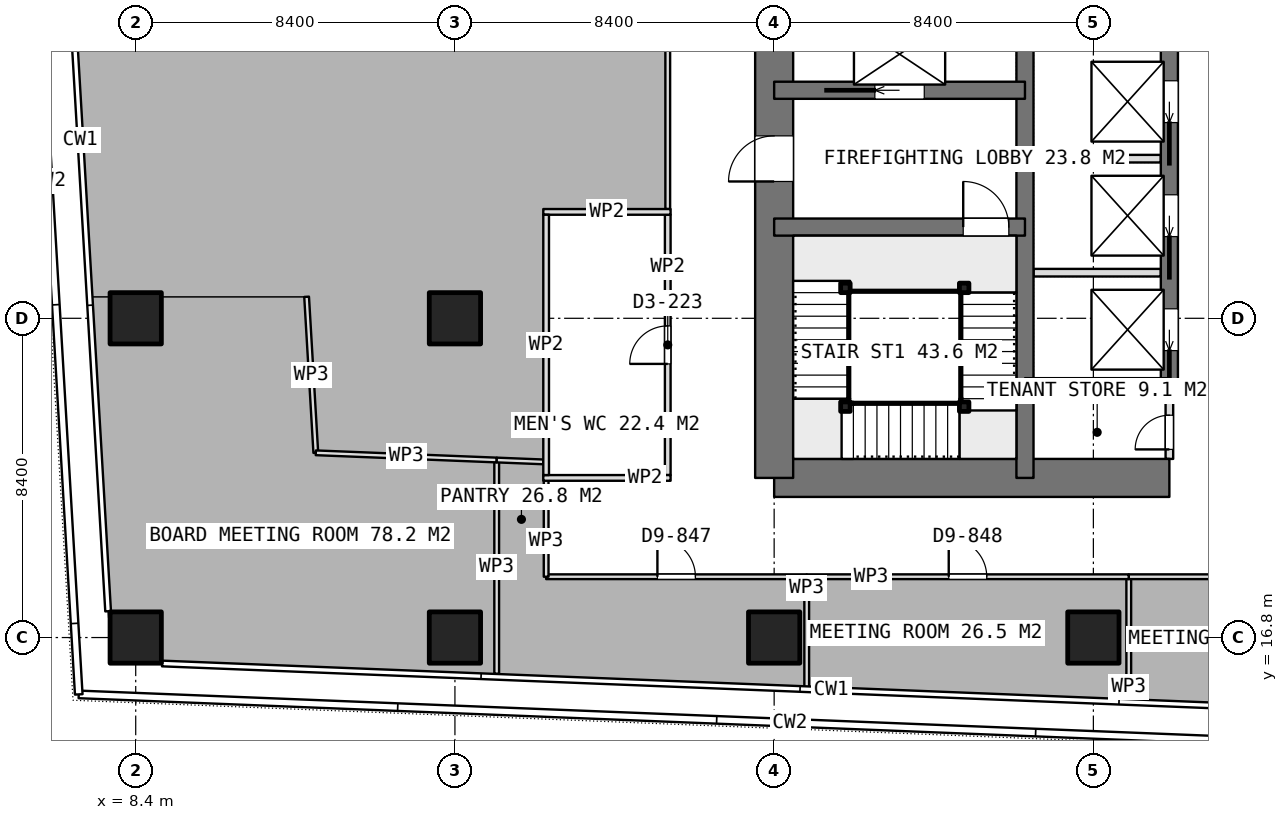
"""IFC4 building model, lengths in metres.
Left out: names, types, materials, properties, quantities, classifications, styles, units other than length and angle.
Written with IfcOpenShell. Run it as: python <this file> out.ifc"""

import sys

from ifc_helpers import new_model, si_unit, direction, frame, frame_2d, origin, origin_2d, place, context, subcontext, project, spatial, rectangle, extrude, element, fill, save


model = new_model("IFC4")
c1 = context("Model", 3, precision=1e-05, world=origin(), true_north=direction((0.0, 1.0)))
c2 = subcontext(c1, "Body", "Model", "MODEL_VIEW")
j1 = project(units=[si_unit("LENGTHUNIT", "METRE"), si_unit("PLANEANGLEUNIT", "RADIAN")], contexts=[c1])
p1 = place(None, origin())
s1 = spatial("IfcSite", under=j1, at=p1, CompositionType="ELEMENT")
p2 = place(p1, origin())
s2 = spatial("IfcBuilding", under=s1, at=p2, CompositionType="ELEMENT")
p3 = place(p2, frame((0.0, 0.0, 210.2)))
s3 = spatial("IfcBuildingStorey", under=s2, at=p3, CompositionType="ELEMENT", Elevation=210.2)
p4 = place(p3, frame((25.2, 21.0, 0.0), z_axis=(0.0, 0.0, 1.0), x_axis=(1.0, 0.0, 0.0)))
e1 = element("IfcWall", 1, at=p4, inside=s3, PredefinedType="SHEAR", context=c2, shape_type="SweptSolid", body=[
    extrude(rectangle(XDim=10.4, YDim=1.0, at=frame_2d((5.2, 0.0))), origin(), (0.0, 0.0, 1.0), 3.75),
])
p5 = place(p3, frame((25.2, 21.0, 0.0), z_axis=(0.0, 0.0, 1.0), x_axis=(0.0, 1.0, 0.0)))
e2 = element("IfcWall", 2, at=p5, inside=s3, PredefinedType="SHEAR", context=c2, shape_type="SweptSolid", body=[
    extrude(rectangle(XDim=25.2, YDim=1.0, at=frame_2d((12.6, 0.0))), origin(), (0.0, 0.0, 1.0), 3.75),
])
p6 = place(p5, frame((7.8, 0.0, 0.0)))
e3 = element("IfcOpeningElement", 3, at=p6, cuts=e2, PredefinedType="OPENING", context=c2, shape_type="SweptSolid", body=[
    extrude(rectangle(XDim=1.2, YDim=2.1, at=frame_2d((0.6, 1.05))), frame((0.0, 0.51, 0.0), z_axis=(0.0, -1.0, 0.0), x_axis=(1.0, 0.0, 0.0)), (0.0, 0.0, 1.0), 1.02),
])
p7 = place(p5, frame((14.25, 0.0, 0.0)))
e4 = element("IfcOpeningElement", 4, at=p7, cuts=e2, PredefinedType="OPENING", context=c2, shape_type="SweptSolid", body=[
    extrude(rectangle(XDim=0.9, YDim=2.1, at=frame_2d((0.45, 1.05))), frame((0.0, 0.51, 0.0), z_axis=(0.0, -1.0, 0.0), x_axis=(1.0, 0.0, 0.0)), (0.0, 0.0, 1.0), 1.02),
])
p8 = place(p5, frame((16.85, 0.0, 0.0)))
e5 = element("IfcOpeningElement", 5, at=p8, cuts=e2, PredefinedType="OPENING", context=c2, shape_type="SweptSolid", body=[
    extrude(rectangle(XDim=0.9, YDim=2.1, at=frame_2d((0.45, 1.05))), frame((0.0, 0.51, 0.0), z_axis=(0.0, -1.0, 0.0), x_axis=(1.0, 0.0, 0.0)), (0.0, 0.0, 1.0), 1.02),
])
p9 = place(p5, frame((19.025, 0.0, 0.0)))
e6 = element("IfcOpeningElement", 6, at=p9, cuts=e2, PredefinedType="OPENING", context=c2, shape_type="SweptSolid", body=[
    extrude(rectangle(XDim=1.2, YDim=2.1, at=frame_2d((0.6, 1.05))), frame((0.0, 0.51, 0.0), z_axis=(0.0, -1.0, 0.0), x_axis=(1.0, 0.0, 0.0)), (0.0, 0.0, 1.0), 1.02),
])
p10 = place(p3, frame((31.8, 21.0, 0.0), z_axis=(0.0, 0.0, 1.0), x_axis=(0.0, 1.0, 0.0)))
e7 = element("IfcWall", 7, at=p10, inside=s3, PredefinedType="SHEAR", context=c2, shape_type="SweptSolid", body=[
    extrude(rectangle(XDim=25.2, YDim=0.45, at=frame_2d((12.6, 0.0))), origin(), (0.0, 0.0, 1.0), 3.75),
])
p11 = place(p3, frame((35.6, 23.4, 0.0), z_axis=(0.0, 0.0, 1.0), x_axis=(0.0, 1.0, 0.0)))
e8 = element("IfcWall", 8, at=p11, inside=s3, PredefinedType="SHEAR", context=c2, shape_type="SweptSolid", body=[
    extrude(rectangle(XDim=18.0, YDim=0.45, at=frame_2d((9.0, 0.0))), origin(), (0.0, 0.0, 1.0), 3.75),
])
p12 = place(p11, frame((0.95, 0.0, 0.0)))
e9 = element("IfcOpeningElement", 9, at=p12, cuts=e8, PredefinedType="OPENING", context=c2, shape_type="SweptSolid", body=[
    extrude(rectangle(XDim=1.1, YDim=2.1, at=frame_2d((0.55, 1.05))), frame((0.0, 0.235, 0.0), z_axis=(0.0, -1.0, 0.0), x_axis=(1.0, 0.0, 0.0)), (0.0, 0.0, 1.0), 0.47),
])
p13 = place(p11, frame((3.95, 0.0, 0.0)))
e10 = element("IfcOpeningElement", 10, at=p13, cuts=e8, PredefinedType="OPENING", context=c2, shape_type="SweptSolid", body=[
    extrude(rectangle(XDim=1.1, YDim=2.1, at=frame_2d((0.55, 1.05))), frame((0.0, 0.235, 0.0), z_axis=(0.0, -1.0, 0.0), x_axis=(1.0, 0.0, 0.0)), (0.0, 0.0, 1.0), 0.47),
])
p14 = place(p11, frame((6.95, 0.0, 0.0)))
e11 = element("IfcOpeningElement", 11, at=p14, cuts=e8, PredefinedType="OPENING", context=c2, shape_type="SweptSolid", body=[
    extrude(rectangle(XDim=1.1, YDim=2.1, at=frame_2d((0.55, 1.05))), frame((0.0, 0.235, 0.0), z_axis=(0.0, -1.0, 0.0), x_axis=(1.0, 0.0, 0.0)), (0.0, 0.0, 1.0), 0.47),
])
p15 = place(p11, frame((9.95, 0.0, 0.0)))
e12 = element("IfcOpeningElement", 12, at=p15, cuts=e8, PredefinedType="OPENING", context=c2, shape_type="SweptSolid", body=[
    extrude(rectangle(XDim=1.1, YDim=2.1, at=frame_2d((0.55, 1.05))), frame((0.0, 0.235, 0.0), z_axis=(0.0, -1.0, 0.0), x_axis=(1.0, 0.0, 0.0)), (0.0, 0.0, 1.0), 0.47),
])
p16 = place(p11, frame((12.95, 0.0, 0.0)))
e13 = element("IfcOpeningElement", 13, at=p16, cuts=e8, PredefinedType="OPENING", context=c2, shape_type="SweptSolid", body=[
    extrude(rectangle(XDim=1.1, YDim=2.1, at=frame_2d((0.55, 1.05))), frame((0.0, 0.235, 0.0), z_axis=(0.0, -1.0, 0.0), x_axis=(1.0, 0.0, 0.0)), (0.0, 0.0, 1.0), 0.47),
])
p17 = place(p11, frame((15.95, 0.0, 0.0)))
e14 = element("IfcOpeningElement", 14, at=p17, cuts=e8, PredefinedType="OPENING", context=c2, shape_type="SweptSolid", body=[
    extrude(rectangle(XDim=1.1, YDim=2.1, at=frame_2d((0.55, 1.05))), frame((0.0, 0.235, 0.0), z_axis=(0.0, -1.0, 0.0), x_axis=(1.0, 0.0, 0.0)), (0.0, 0.0, 1.0), 0.47),
])
p18 = place(p3, frame((31.8, 23.4, 0.0), z_axis=(0.0, 0.0, 1.0), x_axis=(1.0, 0.0, 0.0)))
e15 = element("IfcWall", 15, at=p18, inside=s3, PredefinedType="SHEAR", context=c2, shape_type="SweptSolid", body=[
    extrude(rectangle(XDim=3.8, YDim=0.45, at=frame_2d((1.9, 0.0))), origin(), (0.0, 0.0, 1.0), 3.75),
])
p19 = place(p3, frame((25.2, 27.6, 0.0), z_axis=(0.0, 0.0, 1.0), x_axis=(1.0, 0.0, 0.0)))
e16 = element("IfcWall", 16, at=p19, inside=s3, PredefinedType="SHEAR", context=c2, shape_type="SweptSolid", body=[
    extrude(rectangle(XDim=6.6, YDim=0.45, at=frame_2d((3.3, 0.0))), origin(), (0.0, 0.0, 1.0), 3.75),
])
p20 = place(p19, frame((4.975, 0.0, 0.0)))
e17 = element("IfcOpeningElement", 17, at=p20, cuts=e16, PredefinedType="OPENING", context=c2, shape_type="SweptSolid", body=[
    extrude(rectangle(XDim=1.2, YDim=2.1, at=frame_2d((0.6, 1.05))), frame((0.0, 0.235, 0.0), z_axis=(0.0, -1.0, 0.0), x_axis=(1.0, 0.0, 0.0)), (0.0, 0.0, 1.0), 0.47),
])
p21 = place(p3, frame((25.2, 31.2, 0.0), z_axis=(0.0, 0.0, 1.0), x_axis=(1.0, 0.0, 0.0)))
e18 = element("IfcWall", 18, at=p21, inside=s3, PredefinedType="SHEAR", context=c2, shape_type="SweptSolid", body=[
    extrude(rectangle(XDim=6.6, YDim=0.45, at=frame_2d((3.3, 0.0))), origin(), (0.0, 0.0, 1.0), 3.75),
])
p22 = place(p21, frame((2.65, 0.0, 0.0)))
e19 = element("IfcOpeningElement", 19, at=p22, cuts=e18, PredefinedType="OPENING", context=c2, shape_type="SweptSolid", body=[
    extrude(rectangle(XDim=1.3, YDim=2.1, at=frame_2d((0.65, 1.05))), frame((0.0, 0.235, 0.0), z_axis=(0.0, -1.0, 0.0), x_axis=(1.0, 0.0, 0.0)), (0.0, 0.0, 1.0), 0.47),
])
for number, where, z_axis, x_axis in (
    (20, (8.4, 16.8, 0.0), (0.0, 0.0, 1.0), (1.0, 0.0, 0.0)),
    (21, (8.4, 25.2, 0.0), (0.0, 0.0, 1.0), (1.0, 0.0, 0.0)),
    (22, (16.8, 16.8, 0.0), (0.0, 0.0, 1.0), (1.0, 0.0, 0.0)),
    (23, (16.8, 25.2, 0.0), (0.0, 0.0, 1.0), (1.0, 0.0, 0.0)),
    (24, (25.2, 16.8, 0.0), (0.0, 0.0, 1.0), (1.0, 0.0, 0.0)),
    (25, (33.6, 16.8, 0.0), (0.0, 0.0, 1.0), (1.0, 0.0, 0.0)),
):
    element("IfcColumn", number, at=place(p3, frame(where, z_axis=z_axis, x_axis=x_axis)), inside=s3, PredefinedType="COLUMN", context=c2, shape_type="SweptSolid", body=[
        extrude(rectangle(XDim=1.35, YDim=1.35, at=origin_2d()), origin(), (0.0, 0.0, 1.0), 3.75),
    ])
for number, where, z_axis, x_axis in (
    (26, (32.025, 26.4, 0.0), (0.0, 0.0, 1.0), (1.0, 0.0, 0.0)),
    (27, (32.025, 29.4, 0.0), (0.0, 0.0, 1.0), (1.0, 0.0, 0.0)),
):
    element("IfcWall", number, at=place(p3, frame(where, z_axis=z_axis, x_axis=x_axis)), inside=s3, PredefinedType="PARTITIONING", context=c2, shape_type="SweptSolid", body=[
        extrude(rectangle(XDim=3.35, YDim=0.2, at=frame_2d((1.675, 0.0))), origin(), (0.0, 0.0, 1.0), 3.5),
    ])
p23 = place(p3, frame((35.6, 21.5, 0.0), z_axis=(0.0, 0.0, 1.0), x_axis=(0.0, 1.0, 0.0)))
e28 = element("IfcWall", 28, at=p23, inside=s3, PredefinedType="PARTITIONING", context=c2, shape_type="SweptSolid", body=[
    extrude(rectangle(XDim=1.675, YDim=0.2, at=frame_2d((0.837, 0.0))), origin(), (0.0, 0.0, 1.0), 3.5),
])
p24 = place(p23, frame((0.25, 0.0, 0.0)))
e29 = element("IfcOpeningElement", 29, at=p24, cuts=e28, PredefinedType="OPENING", context=c2, shape_type="SweptSolid", body=[
    extrude(rectangle(XDim=0.9, YDim=2.1, at=frame_2d((0.45, 1.05))), frame((0.0, 0.11, 0.0), z_axis=(0.0, -1.0, 0.0), x_axis=(1.0, 0.0, 0.0)), (0.0, 0.0, 1.0), 0.22),
])
for number, where, z_axis, x_axis in (
    (30, (19.125, 21.0, 0.0), (0.0, 0.0, 1.0), (1.0, 0.0, 0.0)),
    (31, (19.125, 28.0, 0.0), (0.0, 0.0, 1.0), (1.0, 0.0, 0.0)),
):
    element("IfcWall", number, at=place(p3, frame(where, z_axis=z_axis, x_axis=x_axis)), inside=s3, PredefinedType="PARTITIONING", context=c2, shape_type="SweptSolid", body=[
        extrude(rectangle(XDim=3.35, YDim=0.15, at=frame_2d((1.675, 0.0))), origin(), (0.0, 0.0, 1.0), 3.5),
    ])
p25 = place(p3, frame((19.2, 21.075, 0.0), z_axis=(0.0, 0.0, 1.0), x_axis=(0.0, 1.0, 0.0)))
e32 = element("IfcWall", 32, at=p25, inside=s3, PredefinedType="PARTITIONING", context=c2, shape_type="SweptSolid", body=[
    extrude(rectangle(XDim=6.85, YDim=0.15, at=frame_2d((3.425, 0.0))), origin(), (0.0, 0.0, 1.0), 3.5),
])
p26 = place(p3, frame((22.4, 21.075, 0.0), z_axis=(0.0, 0.0, 1.0), x_axis=(0.0, 1.0, 0.0)))
e33 = element("IfcWall", 33, at=p26, inside=s3, PredefinedType="PARTITIONING", context=c2, shape_type="SweptSolid", body=[
    extrude(rectangle(XDim=6.85, YDim=0.15, at=frame_2d((3.425, 0.0))), origin(), (0.0, 0.0, 1.0), 3.5),
])
p27 = place(p26, frame((2.925, 0.0, 0.0)))
e34 = element("IfcOpeningElement", 34, at=p27, cuts=e33, PredefinedType="OPENING", context=c2, shape_type="SweptSolid", body=[
    extrude(rectangle(XDim=1.0, YDim=2.1, at=frame_2d((0.5, 1.05))), frame((0.0, 0.085, 0.0), z_axis=(0.0, -1.0, 0.0), x_axis=(1.0, 0.0, 0.0)), (0.0, 0.0, 1.0), 0.17),
])
p28 = place(p3, frame((34.531, 15.182, 0.0), z_axis=(0.0, 0.0, 1.0), x_axis=(0.0, 1.0, 0.0)))
e35 = element("IfcWall", 35, at=p28, inside=s3, PredefinedType="PARTITIONING", context=c2, shape_type="SweptSolid", body=[
    extrude(rectangle(XDim=3.218, YDim=0.125, at=frame_2d((1.609, 0.0))), origin(), (0.0, 0.0, 1.0), 3.5),
])
p29 = place(p3, frame((34.531, 18.4, 0.0), z_axis=(0.0, 0.0, 1.0), x_axis=(1.0, 0.0, 0.0)))
e36 = element("IfcWall", 36, at=p29, inside=s3, PredefinedType="PARTITIONING", context=c2, shape_type="SweptSolid", body=[
    extrude(rectangle(XDim=8.292, YDim=0.125, at=frame_2d((4.146, 0.0))), origin(), (0.0, 0.0, 1.0), 3.5),
])
p30 = place(p29, frame((3.646, 0.0, 0.0)))
e37 = element("IfcOpeningElement", 37, at=p30, cuts=e36, PredefinedType="OPENING", context=c2, shape_type="SweptSolid", body=[
    extrude(rectangle(XDim=1.0, YDim=2.1, at=frame_2d((0.5, 1.05))), frame((0.0, 0.073, 0.0), z_axis=(0.0, -1.0, 0.0), x_axis=(1.0, 0.0, 0.0)), (0.0, 0.0, 1.0), 0.145),
])
p31 = place(p3, frame((17.899, 21.471, 0.0), z_axis=(0.0, 0.0, 1.0), x_axis=(0.0, -1.0, 0.0)))
e38 = element("IfcWall", 38, at=p31, inside=s3, PredefinedType="PARTITIONING", context=c2, shape_type="SweptSolid", body=[
    extrude(rectangle(XDim=5.625, YDim=0.125, at=frame_2d((2.812, 0.0))), origin(), (0.0, 0.0, 1.0), 3.5),
])
p32 = place(p3, frame((12.897, 25.766, 0.0), z_axis=(0.0, 0.0, 1.0), x_axis=(0.058833387196, -0.998267816045, 0.0)))
e39 = element("IfcWall", 39, at=p32, inside=s3, PredefinedType="PARTITIONING", context=c2, shape_type="SweptSolid", body=[
    extrude(rectangle(XDim=4.112, YDim=0.125, at=frame_2d((2.056, 0.0))), origin(), (0.0, 0.0, 1.0), 3.5),
])
p33 = place(p3, frame((13.139, 21.661, 0.0), z_axis=(0.0, 0.0, 1.0), x_axis=(0.999204801872, -0.039871843661, 0.0)))
e40 = element("IfcWall", 40, at=p33, inside=s3, PredefinedType="PARTITIONING", context=c2, shape_type="SweptSolid", body=[
    extrude(rectangle(XDim=4.764, YDim=0.125, at=frame_2d((2.382, 0.0))), origin(), (0.0, 0.0, 1.0), 3.5),
])
p34 = place(p3, frame((19.2, 18.4, 0.0), z_axis=(0.0, 0.0, 1.0), x_axis=(1.0, 0.0, 0.0)))
e41 = element("IfcWall", 41, at=p34, inside=s3, PredefinedType="PARTITIONING", context=c2, shape_type="SweptSolid", body=[
    extrude(rectangle(XDim=6.857, YDim=0.125, at=frame_2d((3.428, 0.0))), origin(), (0.0, 0.0, 1.0), 3.5),
])
p35 = place(p34, frame((2.928, 0.0, 0.0)))
e42 = element("IfcOpeningElement", 42, at=p35, cuts=e41, PredefinedType="OPENING", context=c2, shape_type="SweptSolid", body=[
    extrude(rectangle(XDim=1.0, YDim=2.1, at=frame_2d((0.5, 1.05))), frame((0.0, 0.073, 0.0), z_axis=(0.0, -1.0, 0.0), x_axis=(1.0, 0.0, 0.0)), (0.0, 0.0, 1.0), 0.145),
])
p36 = place(p3, frame((26.057, 18.4, 0.0), z_axis=(0.0, 0.0, 1.0), x_axis=(0.0, -1.0, 0.0)))
e43 = element("IfcWall", 43, at=p36, inside=s3, PredefinedType="PARTITIONING", context=c2, shape_type="SweptSolid", body=[
    extrude(rectangle(XDim=2.91, YDim=0.125, at=frame_2d((1.455, 0.0))), origin(), (0.0, 0.0, 1.0), 3.5),
])
p37 = place(p3, frame((17.9, 21.471, 0.0), z_axis=(0.0, 0.0, 1.0), x_axis=(0.999206674093, -0.039824897333, 0.0)))
e44 = element("IfcWall", 44, at=p37, inside=s3, PredefinedType="PARTITIONING", context=c2, shape_type="SweptSolid", body=[
    extrude(rectangle(XDim=1.226, YDim=0.125, at=frame_2d((0.613, 0.0))), origin(), (0.0, 0.0, 1.0), 3.5),
])
p38 = place(p3, frame((19.2, 21.075, 0.0), z_axis=(0.0, 0.0, 1.0), x_axis=(0.0, -1.0, 0.0)))
e45 = element("IfcWall", 45, at=p38, inside=s3, PredefinedType="PARTITIONING", context=c2, shape_type="SweptSolid", body=[
    extrude(rectangle(XDim=2.675, YDim=0.125, at=frame_2d((1.337, 0.0))), origin(), (0.0, 0.0, 1.0), 3.5),
])
p39 = place(p3, frame((26.058, 18.4, 0.0), z_axis=(0.0, 0.0, 1.0), x_axis=(1.0, 0.0, 0.0)))
e46 = element("IfcWall", 46, at=p39, inside=s3, PredefinedType="PARTITIONING", context=c2, shape_type="SweptSolid", body=[
    extrude(rectangle(XDim=8.472, YDim=0.125, at=frame_2d((4.236, 0.0))), origin(), (0.0, 0.0, 1.0), 3.5),
])
p40 = place(p39, frame((3.736, 0.0, 0.0)))
e47 = element("IfcOpeningElement", 47, at=p40, cuts=e46, PredefinedType="OPENING", context=c2, shape_type="SweptSolid", body=[
    extrude(rectangle(XDim=1.0, YDim=2.1, at=frame_2d((0.5, 1.05))), frame((0.0, 0.073, 0.0), z_axis=(0.0, -1.0, 0.0), x_axis=(1.0, 0.0, 0.0)), (0.0, 0.0, 1.0), 0.145),
])
p41 = place(p3, frame((22.4, 52.575, 0.0), z_axis=(0.0, 0.0, 1.0), x_axis=(0.0, -1.0, 0.0)))
e48 = element("IfcWall", 48, at=p41, inside=s3, PredefinedType="PARTITIONING", context=c2, shape_type="SweptSolid", body=[
    extrude(rectangle(XDim=24.5, YDim=0.125, at=frame_2d((12.25, 0.0))), origin(), (0.0, 0.0, 1.0), 3.5),
])
p42 = place(p41, frame((11.388, 0.0, 0.0)))
e49 = element("IfcOpeningElement", 49, at=p42, cuts=e48, PredefinedType="OPENING", context=c2, shape_type="SweptSolid", body=[
    extrude(rectangle(XDim=1.8, YDim=2.1, at=frame_2d((0.9, 1.05))), frame((0.0, 0.073, 0.0), z_axis=(0.0, -1.0, 0.0), x_axis=(1.0, 0.0, 0.0)), (0.0, 0.0, 1.0), 0.145),
])
for number, where, z_axis, x_axis in (
    (50, (30.2, 26.0, 0.0), (0.0, 0.0, 1.0), (1.0, 0.0, 0.0)),
    (51, (30.2, 22.875, 0.0), (0.0, 0.0, 1.0), (1.0, 0.0, 0.0)),
    (52, (27.075, 22.875, 0.0), (0.0, 0.0, 1.0), (1.0, 0.0, 0.0)),
    (53, (27.075, 26.0, 0.0), (0.0, 0.0, 1.0), (1.0, 0.0, 0.0)),
):
    element("IfcColumn", number, at=place(p3, frame(where, z_axis=z_axis, x_axis=x_axis)), inside=s3, PredefinedType="COLUMN", context=c2, shape_type="SweptSolid", body=[
        extrude(rectangle(XDim=0.25, YDim=0.25, at=origin_2d()), origin(), (0.0, 0.0, 1.0), 3.75),
    ])
p43 = place(p6, origin())
e54 = element("IfcDoor", 54, at=p43, inside=s3, OperationType="SINGLE_SWING_LEFT", PredefinedType="DOOR", context=c2, shape_type="SweptSolid", body=[
    extrude(rectangle(XDim=1.2, YDim=2.1, at=frame_2d((0.6, 1.05))), frame((0.0, 0.025, 0.0), z_axis=(0.0, -1.0, 0.0), x_axis=(1.0, 0.0, 0.0)), (0.0, 0.0, 1.0), 0.05),
])
fill(e3, e54)
p44 = place(p24, origin())
e55 = element("IfcDoor", 55, at=p44, inside=s3, OperationType="SINGLE_SWING_LEFT", PredefinedType="DOOR", context=c2, shape_type="SweptSolid", body=[
    extrude(rectangle(XDim=0.9, YDim=2.1, at=frame_2d((0.45, 1.05))), frame((0.0, 0.025, 0.0), z_axis=(0.0, -1.0, 0.0), x_axis=(1.0, 0.0, 0.0)), (0.0, 0.0, 1.0), 0.05),
])
fill(e29, e55)
p45 = place(p12, origin())
e56 = element("IfcDoor", 56, at=p45, inside=s3, OperationType="SLIDING_TO_LEFT", PredefinedType="USERDEFINED", context=c2, shape_type="SweptSolid", body=[
    extrude(rectangle(XDim=1.1, YDim=2.1, at=frame_2d((0.55, 1.05))), frame((0.0, 0.025, 0.0), z_axis=(0.0, -1.0, 0.0), x_axis=(1.0, 0.0, 0.0)), (0.0, 0.0, 1.0), 0.05),
])
fill(e9, e56)
p46 = place(p13, origin())
e57 = element("IfcDoor", 57, at=p46, inside=s3, OperationType="SLIDING_TO_LEFT", PredefinedType="USERDEFINED", context=c2, shape_type="SweptSolid", body=[
    extrude(rectangle(XDim=1.1, YDim=2.1, at=frame_2d((0.55, 1.05))), frame((0.0, 0.025, 0.0), z_axis=(0.0, -1.0, 0.0), x_axis=(1.0, 0.0, 0.0)), (0.0, 0.0, 1.0), 0.05),
])
fill(e10, e57)
p47 = place(p14, origin())
e58 = element("IfcDoor", 58, at=p47, inside=s3, OperationType="SLIDING_TO_LEFT", PredefinedType="USERDEFINED", context=c2, shape_type="SweptSolid", body=[
    extrude(rectangle(XDim=1.1, YDim=2.1, at=frame_2d((0.55, 1.05))), frame((0.0, 0.025, 0.0), z_axis=(0.0, -1.0, 0.0), x_axis=(1.0, 0.0, 0.0)), (0.0, 0.0, 1.0), 0.05),
])
fill(e11, e58)
p48 = place(p22, origin())
e59 = element("IfcDoor", 59, at=p48, inside=s3, OperationType="SLIDING_TO_LEFT", PredefinedType="USERDEFINED", context=c2, shape_type="SweptSolid", body=[
    extrude(rectangle(XDim=1.3, YDim=2.1, at=frame_2d((0.65, 1.05))), frame((0.0, 0.025, 0.0), z_axis=(0.0, -1.0, 0.0), x_axis=(1.0, 0.0, 0.0)), (0.0, 0.0, 1.0), 0.05),
])
fill(e19, e59)
p49 = place(p27, origin())
e60 = element("IfcDoor", 60, at=p49, inside=s3, OperationType="SINGLE_SWING_LEFT", PredefinedType="DOOR", context=c2, shape_type="SweptSolid", body=[
    extrude(rectangle(XDim=1.0, YDim=2.1, at=frame_2d((0.5, 1.05))), frame((0.0, 0.025, 0.0), z_axis=(0.0, -1.0, 0.0), x_axis=(1.0, 0.0, 0.0)), (0.0, 0.0, 1.0), 0.05),
])
fill(e34, e60)
p50 = place(p35, origin())
e61 = element("IfcDoor", 61, at=p50, inside=s3, OperationType="SINGLE_SWING_LEFT", PredefinedType="DOOR", context=c2, shape_type="SweptSolid", body=[
    extrude(rectangle(XDim=1.0, YDim=2.1, at=frame_2d((0.5, 1.05))), frame((0.0, 0.025, 0.0), z_axis=(0.0, -1.0, 0.0), x_axis=(1.0, 0.0, 0.0)), (0.0, 0.0, 1.0), 0.05),
])
fill(e42, e61)
p51 = place(p40, origin())
e62 = element("IfcDoor", 62, at=p51, inside=s3, OperationType="SINGLE_SWING_LEFT", PredefinedType="DOOR", context=c2, shape_type="SweptSolid", body=[
    extrude(rectangle(XDim=1.0, YDim=2.1, at=frame_2d((0.5, 1.05))), frame((0.0, 0.025, 0.0), z_axis=(0.0, -1.0, 0.0), x_axis=(1.0, 0.0, 0.0)), (0.0, 0.0, 1.0), 0.05),
])
fill(e47, e62)
p52 = place(p20, origin())
e63 = element("IfcDoor", 63, at=p52, inside=s3, OperationType="SINGLE_SWING_RIGHT", PredefinedType="DOOR", context=c2, shape_type="SweptSolid", body=[
    extrude(rectangle(XDim=1.2, YDim=2.1, at=frame_2d((0.6, 1.05))), frame((0.0, 0.025, 0.0), z_axis=(0.0, -1.0, 0.0), x_axis=(1.0, 0.0, 0.0)), (0.0, 0.0, 1.0), 0.05),
])
fill(e17, e63)
save(model, sys.argv[1])
